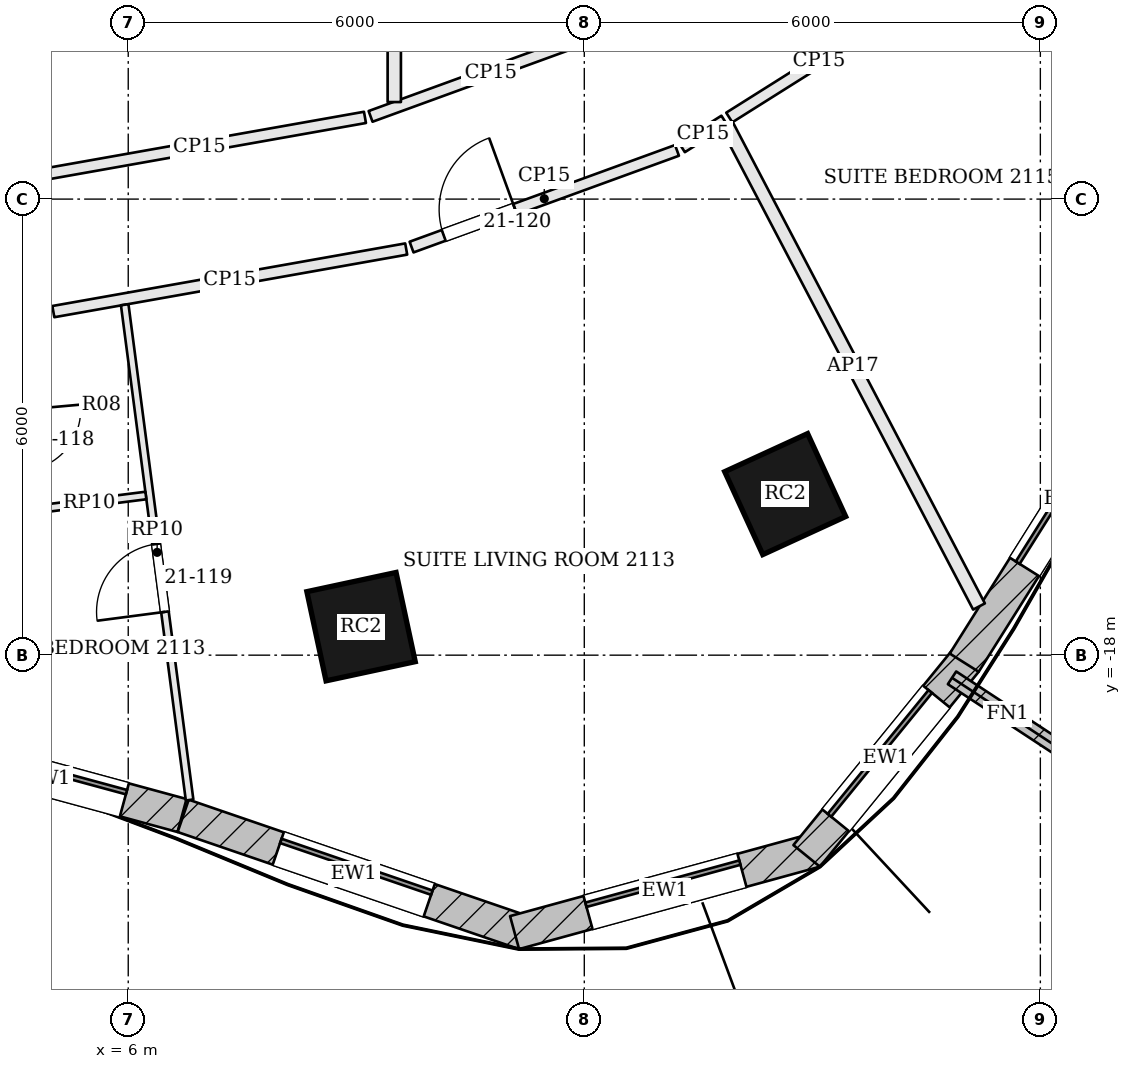
"""IFC4 building model, lengths in metres.
Left out: names, types, materials, properties, quantities, classifications, styles, units other than length and angle.
Written with IfcOpenShell. Run it as: python <this file> out.ifc"""

import sys

from ifc_helpers import new_model, si_unit, direction, frame, frame_2d, origin, origin_2d, place, context, subcontext, project, spatial, rectangle, extrude, element, fill, save


model = new_model("IFC4")
c1 = context("Model", 3, precision=1e-05, world=origin(), true_north=direction((0.0, 1.0)))
c2 = subcontext(c1, "Body", "Model", "MODEL_VIEW")
j1 = project(units=[si_unit("LENGTHUNIT", "METRE"), si_unit("PLANEANGLEUNIT", "RADIAN")], contexts=[c1])
p1 = place(None, origin())
s1 = spatial("IfcSite", under=j1, at=p1, CompositionType="ELEMENT")
p2 = place(p1, origin())
s2 = spatial("IfcBuilding", under=s1, at=p2, CompositionType="ELEMENT")
p3 = place(p2, frame((0.0, 0.0, 92.4)))
s3 = spatial("IfcBuildingStorey", under=s2, at=p3, CompositionType="ELEMENT", Elevation=92.4)
for number, where, z_axis, x_axis in (
    (1, (9.063, -17.625, 0.0), (0.0, 0.0, 1.0), (0.978, 0.21, 0.0)),
    (2, (14.643, -15.881, 0.0), (0.0, 0.0, 1.0), (0.909, 0.417, 0.0)),
):
    element("IfcColumn", number, at=place(p3, frame(where, z_axis=z_axis, x_axis=x_axis)), inside=s3, PredefinedType="COLUMN", context=c2, shape_type="SweptSolid", body=[
        extrude(rectangle(XDim=1.2, YDim=1.2, at=origin_2d()), origin(), (0.0, 0.0, 1.0), 3.6),
    ])
p4 = place(p3, frame((3.164, -19.147, 0.0), z_axis=(0.0, 0.0, 1.0), x_axis=(0.965039479998, -0.262104563191, 0.0)))
e3 = element("IfcWall", 3, at=p4, inside=s3, PredefinedType="SOLIDWALL", context=c2, shape_type="SweptSolid", body=[
    extrude(rectangle(XDim=3.672, YDim=0.45, at=frame_2d((1.836, 0.0))), origin(), (0.0, 0.0, 1.0), 3.4),
])
p5 = place(p4, frame((0.786, 0.0, 0.9)))
e4 = element("IfcOpeningElement", 4, at=p5, cuts=e3, PredefinedType="OPENING", context=c2, shape_type="SweptSolid", body=[
    extrude(rectangle(XDim=2.1, YDim=2.0, at=frame_2d((1.05, 1.0))), frame((0.0, 0.235, 0.0), z_axis=(0.0, -1.0, 0.0), x_axis=(1.0, 0.0, 0.0)), (0.0, 0.0, 1.0), 0.47),
])
p6 = place(p3, frame((6.723, -20.114, 0.0), z_axis=(0.0, 0.0, 1.0), x_axis=(0.945947299026, -0.324320377815, 0.0)))
e5 = element("IfcWall", 5, at=p6, inside=s3, PredefinedType="SOLIDWALL", context=c2, shape_type="SweptSolid", body=[
    extrude(rectangle(XDim=4.745, YDim=0.45, at=frame_2d((2.372, 0.0))), origin(), (0.0, 0.0, 1.0), 3.4),
])
p7 = place(p6, frame((1.322, 0.0, 0.9)))
e6 = element("IfcOpeningElement", 6, at=p7, cuts=e5, PredefinedType="OPENING", context=c2, shape_type="SweptSolid", body=[
    extrude(rectangle(XDim=2.1, YDim=2.0, at=frame_2d((1.05, 1.0))), frame((0.0, 0.235, 0.0), z_axis=(0.0, -1.0, 0.0), x_axis=(1.0, 0.0, 0.0)), (0.0, 0.0, 1.0), 0.47),
])
p8 = place(p3, frame((11.083, -21.65, 0.0), z_axis=(0.0, 0.0, 1.0), x_axis=(0.964483204983, 0.264144179011, 0.0)))
e7 = element("IfcWall", 7, at=p8, inside=s3, PredefinedType="SOLIDWALL", context=c2, shape_type="SweptSolid", body=[
    extrude(rectangle(XDim=4.104, YDim=0.45, at=frame_2d((2.052, 0.0))), origin(), (0.0, 0.0, 1.0), 3.4),
])
p9 = place(p8, frame((1.002, 0.0, 0.9)))
e8 = element("IfcOpeningElement", 8, at=p9, cuts=e7, PredefinedType="OPENING", context=c2, shape_type="SweptSolid", body=[
    extrude(rectangle(XDim=2.1, YDim=2.0, at=frame_2d((1.05, 1.0))), frame((0.0, 0.235, 0.0), z_axis=(0.0, -1.0, 0.0), x_axis=(1.0, 0.0, 0.0)), (0.0, 0.0, 1.0), 0.47),
])
p10 = place(p3, frame((14.926, -20.641, 0.0), z_axis=(0.0, 0.0, 1.0), x_axis=(0.631548074669, 0.775336720001, 0.0)))
e9 = element("IfcWall", 9, at=p10, inside=s3, PredefinedType="SOLIDWALL", context=c2, shape_type="SweptSolid", body=[
    extrude(rectangle(XDim=3.308, YDim=0.45, at=frame_2d((1.654, 0.0))), origin(), (0.0, 0.0, 1.0), 3.4),
])
p11 = place(p10, frame((0.604, 0.0, 0.9)))
e10 = element("IfcOpeningElement", 10, at=p11, cuts=e9, PredefinedType="OPENING", context=c2, shape_type="SweptSolid", body=[
    extrude(rectangle(XDim=2.1, YDim=2.0, at=frame_2d((1.05, 1.0))), frame((0.0, 0.235, 0.0), z_axis=(0.0, -1.0, 0.0), x_axis=(1.0, 0.0, 0.0)), (0.0, 0.0, 1.0), 0.47),
])
p12 = place(p3, frame((16.998, -18.099, 0.0), z_axis=(0.0, 0.0, 1.0), x_axis=(0.532745661304, 0.846275404559, 0.0)))
e11 = element("IfcWall", 11, at=p12, inside=s3, PredefinedType="SOLIDWALL", context=c2, shape_type="SweptSolid", body=[
    extrude(rectangle(XDim=5.076, YDim=0.45, at=frame_2d((2.538, 0.0))), origin(), (0.0, 0.0, 1.0), 3.4),
])
p13 = place(p12, frame((1.488, 0.0, 0.9)))
e12 = element("IfcOpeningElement", 12, at=p13, cuts=e11, PredefinedType="OPENING", context=c2, shape_type="SweptSolid", body=[
    extrude(rectangle(XDim=2.1, YDim=2.0, at=frame_2d((1.05, 1.0))), frame((0.0, 0.235, 0.0), z_axis=(0.0, -1.0, 0.0), x_axis=(1.0, 0.0, 0.0)), (0.0, 0.0, 1.0), 0.47),
])
p14 = place(p3, frame((16.838, -18.298, 0.0), z_axis=(0.0, 0.0, 1.0), x_axis=(0.835871900419, -0.548924554097, 0.0)))
e13 = element("IfcWall", 13, at=p14, inside=s3, PredefinedType="SOLIDWALL", context=c2, shape_type="SweptSolid", body=[
    extrude(rectangle(XDim=1.75, YDim=0.2, at=frame_2d((0.875, 0.0))), origin(), (0.0, 0.0, 1.0), 3.4),
])
p15 = place(p3, frame((5.015, -13.48, 0.0), z_axis=(0.0, 0.0, 1.0), x_axis=(0.984637772103, 0.174609443467, 0.0)))
e14 = element("IfcWall", 14, at=p15, inside=s3, PredefinedType="PARTITIONING", context=c2, shape_type="SweptSolid", body=[
    extrude(rectangle(XDim=4.715, YDim=0.15, at=frame_2d((2.357, 0.0))), origin(), (0.0, 0.0, 1.0), 2.784),
])
p16 = place(p3, frame((9.728, -12.631, 0.0), z_axis=(0.0, 0.0, 1.0), x_axis=(0.939626438181, 0.342201923826, 0.0)))
e15 = element("IfcWall", 15, at=p16, inside=s3, PredefinedType="PARTITIONING", context=c2, shape_type="SweptSolid", body=[
    extrude(rectangle(XDim=3.716, YDim=0.15, at=frame_2d((1.858, 0.0))), origin(), (0.0, 0.0, 1.0), 2.784),
])
p17 = place(p16, frame((0.45, 0.0, 0.0)))
e16 = element("IfcOpeningElement", 16, at=p17, cuts=e15, PredefinedType="OPENING", context=c2, shape_type="SweptSolid", body=[
    extrude(rectangle(XDim=1.0, YDim=2.1, at=frame_2d((0.5, 1.05))), frame((0.0, 0.085, 0.0), z_axis=(0.0, -1.0, 0.0), x_axis=(1.0, 0.0, 0.0)), (0.0, 0.0, 1.0), 0.17),
])
p18 = place(p3, frame((13.283, -11.319, 0.0), z_axis=(0.0, 0.0, 1.0), x_axis=(0.846275904875, 0.532744866543, 0.0)))
e17 = element("IfcWall", 17, at=p18, inside=s3, PredefinedType="PARTITIONING", context=c2, shape_type="SweptSolid", body=[
    extrude(rectangle(XDim=0.663, YDim=0.15, at=frame_2d((0.331, 0.0))), origin(), (0.0, 0.0, 1.0), 2.784),
])
p19 = place(p3, frame((17.193, -17.36, 0.0), z_axis=(0.0, 0.0, 1.0), x_axis=(-0.464005717448, 0.8858322043, 0.0)))
e18 = element("IfcWall", 18, at=p19, inside=s3, PredefinedType="PARTITIONING", context=c2, shape_type="SweptSolid", body=[
    extrude(rectangle(XDim=7.143, YDim=0.175, at=frame_2d((3.571, 0.0))), origin(), (0.0, 0.0, 1.0), 2.784),
])
p20 = place(p3, frame((13.907, -10.927, 0.0), z_axis=(0.0, 0.0, 1.0), x_axis=(0.846289768331, 0.53272284353, 0.0)))
e19 = element("IfcWall", 19, at=p20, inside=s3, PredefinedType="PARTITIONING", context=c2, shape_type="SweptSolid", body=[
    extrude(rectangle(XDim=2.793, YDim=0.15, at=frame_2d((1.396, 0.0))), origin(), (0.0, 0.0, 1.0), 2.784),
])
p21 = place(p3, frame((12.353, -9.76, 0.0), z_axis=(0.0, 0.0, 1.0), x_axis=(-0.939632450309, -0.342185415127, 0.0)))
e20 = element("IfcWall", 20, at=p21, inside=s3, PredefinedType="PARTITIONING", context=c2, shape_type="SweptSolid", body=[
    extrude(rectangle(XDim=3.368, YDim=0.15, at=frame_2d((1.684, 0.0))), origin(), (0.0, 0.0, 1.0), 2.784),
])
p22 = place(p3, frame((9.115, -10.925, 0.0), z_axis=(0.0, 0.0, 1.0), x_axis=(-0.984632605417, -0.174638576352, 0.0)))
e21 = element("IfcWall", 21, at=p22, inside=s3, PredefinedType="PARTITIONING", context=c2, shape_type="SweptSolid", body=[
    extrude(rectangle(XDim=4.423, YDim=0.15, at=frame_2d((2.211, 0.0))), origin(), (0.0, 0.0, 1.0), 2.784),
])
p23 = place(p3, frame((6.807, -19.905, 0.0), z_axis=(0.0, 0.0, 1.0), x_axis=(-0.129895112789, 0.991527740244, 0.0)))
e22 = element("IfcWall", 22, at=p23, inside=s3, PredefinedType="PARTITIONING", context=c2, shape_type="SweptSolid", body=[
    extrude(rectangle(XDim=6.571, YDim=0.1, at=frame_2d((3.285, 0.0))), origin(), (0.0, 0.0, 1.0), 2.884),
])
p24 = place(p23, frame((2.496, 0.0, 0.0)))
e23 = element("IfcOpeningElement", 23, at=p24, cuts=e22, PredefinedType="OPENING", context=c2, shape_type="SweptSolid", body=[
    extrude(rectangle(XDim=0.9, YDim=2.4, at=frame_2d((0.45, 1.2))), frame((0.0, 0.06, 0.0), z_axis=(0.0, -1.0, 0.0), x_axis=(1.0, 0.0, 0.0)), (0.0, 0.0, 1.0), 0.12),
])
p25 = place(p3, frame((4.742, -16.089, 0.0), z_axis=(0.0, 0.0, 1.0), x_axis=(0.992013080374, 0.126135040205, 0.0)))
e24 = element("IfcWall", 24, at=p25, inside=s3, PredefinedType="PARTITIONING", context=c2, shape_type="SweptSolid", body=[
    extrude(rectangle(XDim=1.502, YDim=0.1, at=frame_2d((0.751, 0.0))), origin(), (0.0, 0.0, 1.0), 2.884),
])
p26 = place(p3, frame((23.256, -11.501, 0.0), z_axis=(0.0, 0.0, 1.0), x_axis=(-0.802700401869, 0.596382482003, 0.0)))
e25 = element("IfcWall", 25, at=p26, inside=s3, PredefinedType="PARTITIONING", context=c2, shape_type="SweptSolid", body=[
    extrude(rectangle(XDim=6.533, YDim=0.1, at=frame_2d((3.267, 0.0))), origin(), (0.0, 0.0, 1.0), 2.884),
])
p27 = place(p26, frame((2.458, 0.0, 0.0)))
e26 = element("IfcOpeningElement", 26, at=p27, cuts=e25, PredefinedType="OPENING", context=c2, shape_type="SweptSolid", body=[
    extrude(rectangle(XDim=0.9, YDim=2.4, at=frame_2d((0.45, 1.2))), frame((0.0, 0.06, 0.0), z_axis=(0.0, -1.0, 0.0), x_axis=(1.0, 0.0, 0.0)), (0.0, 0.0, 1.0), 0.12),
])
p28 = place(p3, frame((17.006, -8.73, 0.0), z_axis=(0.0, 0.0, 1.0), x_axis=(0.722927369978, -0.690924031813, 0.0)))
e27 = element("IfcWall", 27, at=p28, inside=s3, PredefinedType="PARTITIONING", context=c2, shape_type="SweptSolid", body=[
    extrude(rectangle(XDim=2.525, YDim=0.1, at=frame_2d((1.263, 0.0))), origin(), (0.0, 0.0, 1.0), 2.884),
])
p29 = place(p28, frame((1.2, 0.0, 0.0)))
e28 = element("IfcOpeningElement", 28, at=p29, cuts=e27, PredefinedType="OPENING", context=c2, shape_type="SweptSolid", body=[
    extrude(rectangle(XDim=0.8, YDim=2.1, at=frame_2d((0.4, 1.05))), frame((0.0, 0.06, 0.0), z_axis=(0.0, -1.0, 0.0), x_axis=(1.0, 0.0, 0.0)), (0.0, 0.0, 1.0), 0.12),
])
p30 = place(p3, frame((9.5, -10.723, 0.0), z_axis=(0.0, 0.0, 1.0), x_axis=(0.0, 1.0, 0.0)))
e29 = element("IfcWall", 29, at=p30, inside=s3, PredefinedType="PARTITIONING", context=c2, shape_type="SweptSolid", body=[
    extrude(rectangle(XDim=5.848, YDim=0.175, at=frame_2d((2.924, 0.0))), origin(), (0.0, 0.0, 1.0), 2.784),
])
p31 = place(p5, origin())
e30 = element("IfcWindow", 30, at=p31, inside=s3, PartitioningType="SINGLE_PANEL", PredefinedType="WINDOW", context=c2, shape_type="SweptSolid", body=[
    extrude(rectangle(XDim=2.1, YDim=2.0, at=frame_2d((1.05, 1.0))), frame((0.0, 0.135, 0.0), z_axis=(0.0, -1.0, 0.0), x_axis=(1.0, 0.0, 0.0)), (0.0, 0.0, 1.0), 0.06),
])
fill(e4, e30)
p32 = place(p7, origin())
e31 = element("IfcWindow", 31, at=p32, inside=s3, PartitioningType="SINGLE_PANEL", PredefinedType="WINDOW", context=c2, shape_type="SweptSolid", body=[
    extrude(rectangle(XDim=2.1, YDim=2.0, at=frame_2d((1.05, 1.0))), frame((0.0, 0.135, 0.0), z_axis=(0.0, -1.0, 0.0), x_axis=(1.0, 0.0, 0.0)), (0.0, 0.0, 1.0), 0.06),
])
fill(e6, e31)
p33 = place(p9, origin())
e32 = element("IfcWindow", 32, at=p33, inside=s3, PartitioningType="SINGLE_PANEL", PredefinedType="WINDOW", context=c2, shape_type="SweptSolid", body=[
    extrude(rectangle(XDim=2.1, YDim=2.0, at=frame_2d((1.05, 1.0))), frame((0.0, 0.135, 0.0), z_axis=(0.0, -1.0, 0.0), x_axis=(1.0, 0.0, 0.0)), (0.0, 0.0, 1.0), 0.06),
])
fill(e8, e32)
p34 = place(p11, origin())
e33 = element("IfcWindow", 33, at=p34, inside=s3, PartitioningType="SINGLE_PANEL", PredefinedType="WINDOW", context=c2, shape_type="SweptSolid", body=[
    extrude(rectangle(XDim=2.1, YDim=2.0, at=frame_2d((1.05, 1.0))), frame((0.0, 0.135, 0.0), z_axis=(0.0, -1.0, 0.0), x_axis=(1.0, 0.0, 0.0)), (0.0, 0.0, 1.0), 0.06),
])
fill(e10, e33)
p35 = place(p13, origin())
e34 = element("IfcWindow", 34, at=p35, inside=s3, PartitioningType="SINGLE_PANEL", PredefinedType="WINDOW", context=c2, shape_type="SweptSolid", body=[
    extrude(rectangle(XDim=2.1, YDim=2.0, at=frame_2d((1.05, 1.0))), frame((0.0, 0.135, 0.0), z_axis=(0.0, -1.0, 0.0), x_axis=(1.0, 0.0, 0.0)), (0.0, 0.0, 1.0), 0.06),
])
fill(e12, e34)
p36 = place(p24, origin())
e35 = element("IfcDoor", 35, at=p36, inside=s3, OperationType="SINGLE_SWING_LEFT", PredefinedType="DOOR", context=c2, shape_type="SweptSolid", body=[
    extrude(rectangle(XDim=0.9, YDim=2.4, at=frame_2d((0.45, 1.2))), frame((0.0, 0.025, 0.0), z_axis=(0.0, -1.0, 0.0), x_axis=(1.0, 0.0, 0.0)), (0.0, 0.0, 1.0), 0.05),
])
fill(e23, e35)
p37 = place(p17, origin())
e36 = element("IfcDoor", 36, at=p37, inside=s3, OperationType="SINGLE_SWING_RIGHT", PredefinedType="DOOR", context=c2, shape_type="SweptSolid", body=[
    extrude(rectangle(XDim=1.0, YDim=2.1, at=frame_2d((0.5, 1.05))), frame((0.0, 0.025, 0.0), z_axis=(0.0, -1.0, 0.0), x_axis=(1.0, 0.0, 0.0)), (0.0, 0.0, 1.0), 0.05),
])
fill(e16, e36)
p38 = place(p29, origin())
e37 = element("IfcDoor", 37, at=p38, inside=s3, OperationType="SINGLE_SWING_LEFT", PredefinedType="DOOR", context=c2, shape_type="SweptSolid", body=[
    extrude(rectangle(XDim=0.8, YDim=2.1, at=frame_2d((0.4, 1.05))), frame((0.0, 0.025, 0.0), z_axis=(0.0, -1.0, 0.0), x_axis=(1.0, 0.0, 0.0)), (0.0, 0.0, 1.0), 0.05),
])
fill(e28, e37)
save(model, sys.argv[1])
